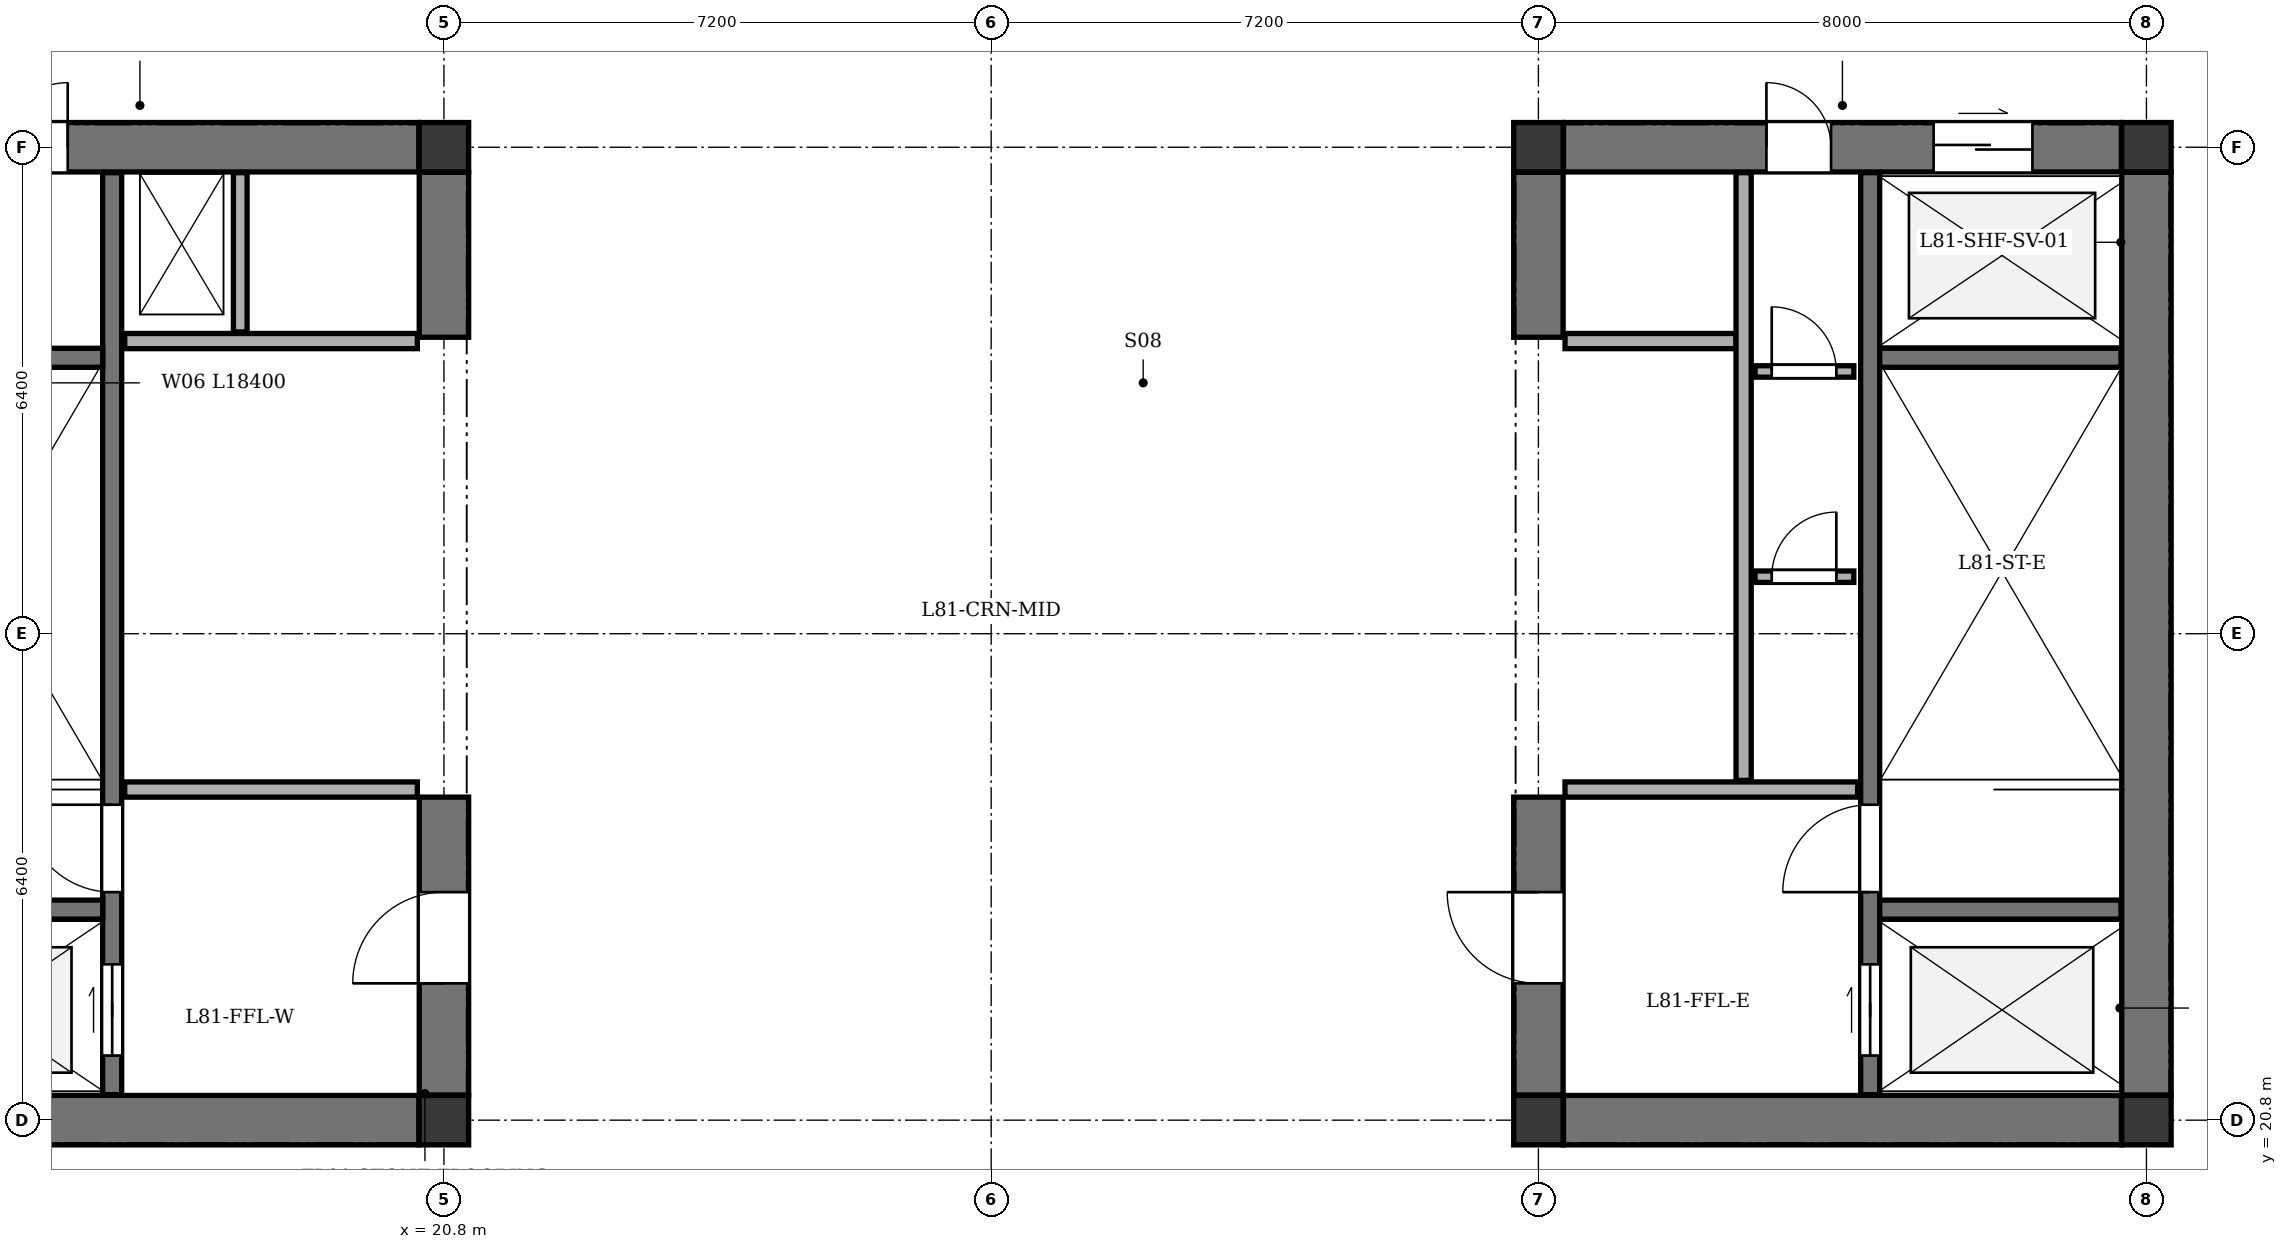
"""IFC4 building model, lengths in metres.
Left out: names, types, materials, properties, quantities, classifications, styles, units other than length and angle.
Written with IfcOpenShell. Run it as: python <this file> out.ifc"""

import sys

from ifc_helpers import new_model, si_unit, direction, frame, frame_2d, origin, origin_2d, place, context, subcontext, project, spatial, rectangle, extrude, element, fill, save


model = new_model("IFC4")
c1 = context("Model", 3, precision=1e-05, world=origin(), true_north=direction((0.0, 1.0)))
c2 = subcontext(c1, "Body", "Model", "MODEL_VIEW")
j1 = project(units=[si_unit("LENGTHUNIT", "METRE"), si_unit("PLANEANGLEUNIT", "RADIAN")], contexts=[c1])
p1 = place(None, origin())
s1 = spatial("IfcSite", under=j1, at=p1, CompositionType="ELEMENT")
p2 = place(p1, origin())
s2 = spatial("IfcBuilding", under=s1, at=p2, CompositionType="ELEMENT")
p3 = place(p2, frame((0.0, 0.0, 309.0)))
s3 = spatial("IfcBuildingStorey", under=s2, at=p3, CompositionType="ELEMENT", Elevation=309.0)
for number, where, z_axis, x_axis in (
    (1, (20.8, 20.8, 0.0), (0.0, 0.0, 1.0), (1.0, 0.0, 0.0)),
    (2, (20.8, 33.6, 0.0), (0.0, 0.0, 1.0), (1.0, 0.0, 0.0)),
    (3, (35.2, 20.8, 0.0), (0.0, 0.0, 1.0), (1.0, 0.0, 0.0)),
    (4, (43.2, 20.8, 0.0), (0.0, 0.0, 1.0), (1.0, 0.0, 0.0)),
    (5, (35.2, 33.6, 0.0), (0.0, 0.0, 1.0), (1.0, 0.0, 0.0)),
    (6, (43.2, 33.6, 0.0), (0.0, 0.0, 1.0), (1.0, 0.0, 0.0)),
):
    element("IfcColumn", number, at=place(p3, frame(where, z_axis=z_axis, x_axis=x_axis)), inside=s3, PredefinedType="COLUMN", context=c2, shape_type="SweptSolid", body=[
        extrude(rectangle(XDim=0.65, YDim=0.65, at=origin_2d()), origin(), (0.0, 0.0, 1.0), 4.2),
    ])
p4 = place(p3, frame((13.13, 20.8, 0.0), z_axis=(0.0, 0.0, 1.0), x_axis=(1.0, 0.0, 0.0)))
e7 = element("IfcWall", 7, at=p4, inside=s3, PredefinedType="SHEAR", context=c2, shape_type="SweptSolid", body=[
    extrude(rectangle(XDim=7.34, YDim=0.65, at=frame_2d((3.67, 0.0))), origin(), (0.0, 0.0, 1.0), 4.28),
])
p5 = place(p3, frame((13.13, 33.6, 0.0), z_axis=(0.0, 0.0, 1.0), x_axis=(1.0, 0.0, 0.0)))
e8 = element("IfcWall", 8, at=p5, inside=s3, PredefinedType="SHEAR", context=c2, shape_type="SweptSolid", body=[
    extrude(rectangle(XDim=7.34, YDim=0.65, at=frame_2d((3.67, 0.0))), origin(), (0.0, 0.0, 1.0), 4.28),
])
p6 = place(p5, frame((0.57, 0.0, 0.0)))
e9 = element("IfcOpeningElement", 9, at=p6, cuts=e8, PredefinedType="OPENING", context=c2, shape_type="SweptSolid", body=[
    extrude(rectangle(XDim=0.85, YDim=2.02, at=frame_2d((0.425, 1.01))), frame((0.0, 0.335, 0.0), z_axis=(0.0, -1.0, 0.0), x_axis=(1.0, 0.0, 0.0)), (0.0, 0.0, 1.0), 0.67),
])
p7 = place(p5, frame((1.87, 0.0, 0.0)))
e10 = element("IfcOpeningElement", 10, at=p7, cuts=e8, PredefinedType="OPENING", context=c2, shape_type="SweptSolid", body=[
    extrude(rectangle(XDim=0.85, YDim=2.02, at=frame_2d((0.425, 1.01))), frame((0.0, 0.335, 0.0), z_axis=(0.0, -1.0, 0.0), x_axis=(1.0, 0.0, 0.0)), (0.0, 0.0, 1.0), 0.67),
])
p8 = place(p3, frame((20.8, 21.13, 0.0), z_axis=(0.0, 0.0, 1.0), x_axis=(0.0, 1.0, 0.0)))
e11 = element("IfcWall", 11, at=p8, inside=s3, PredefinedType="SHEAR", context=c2, shape_type="SweptSolid", body=[
    extrude(rectangle(XDim=3.92, YDim=0.65, at=frame_2d((1.96, 0.0))), origin(), (0.0, 0.0, 1.0), 4.28),
])
p9 = place(p8, frame((1.47, 0.0, 0.0)))
e12 = element("IfcOpeningElement", 12, at=p9, cuts=e11, PredefinedType="OPENING", context=c2, shape_type="SweptSolid", body=[
    extrude(rectangle(XDim=1.2, YDim=2.15, at=frame_2d((0.6, 1.075))), frame((0.0, 0.335, 0.0), z_axis=(0.0, -1.0, 0.0), x_axis=(1.0, 0.0, 0.0)), (0.0, 0.0, 1.0), 0.67),
])
p10 = place(p3, frame((20.8, 31.1, 0.0), z_axis=(0.0, 0.0, 1.0), x_axis=(0.0, 1.0, 0.0)))
e13 = element("IfcWall", 13, at=p10, inside=s3, PredefinedType="SHEAR", context=c2, shape_type="SweptSolid", body=[
    extrude(rectangle(XDim=2.17, YDim=0.65, at=frame_2d((1.085, 0.0))), origin(), (0.0, 0.0, 1.0), 4.28),
])
p11 = place(p3, frame((16.435, 21.135, 0.0), z_axis=(0.0, 0.0, 1.0), x_axis=(0.0, 1.0, 0.0)))
e14 = element("IfcWall", 14, at=p11, inside=s3, PredefinedType="SHEAR", context=c2, shape_type="SweptSolid", body=[
    extrude(rectangle(XDim=12.13, YDim=0.25, at=frame_2d((6.065, 0.0))), origin(), (0.0, 0.0, 1.0), 4.28),
])
p12 = place(p11, frame((0.515, 0.0, 0.0)))
e15 = element("IfcOpeningElement", 15, at=p12, cuts=e14, PredefinedType="OPENING", context=c2, shape_type="SweptSolid", body=[
    extrude(rectangle(XDim=1.2, YDim=2.15, at=frame_2d((0.6, 1.075))), frame((0.0, 0.135, 0.0), z_axis=(0.0, -1.0, 0.0), x_axis=(1.0, 0.0, 0.0)), (0.0, 0.0, 1.0), 0.27),
])
p13 = place(p11, frame((2.665, 0.0, 0.0)))
e16 = element("IfcOpeningElement", 16, at=p13, cuts=e14, PredefinedType="OPENING", context=c2, shape_type="SweptSolid", body=[
    extrude(rectangle(XDim=1.15, YDim=2.15, at=frame_2d((0.575, 1.075))), frame((0.0, 0.135, 0.0), z_axis=(0.0, -1.0, 0.0), x_axis=(1.0, 0.0, 0.0)), (0.0, 0.0, 1.0), 0.27),
])
for number, where, z_axis, x_axis in (
    (17, (13.135, 23.57, 0.0), (0.0, 0.0, 1.0), (1.0, 0.0, 0.0)),
    (18, (13.135, 30.83, 0.0), (0.0, 0.0, 1.0), (1.0, 0.0, 0.0)),
):
    element("IfcWall", number, at=place(p3, frame(where, z_axis=z_axis, x_axis=x_axis)), inside=s3, PredefinedType="SHEAR", context=c2, shape_type="SweptSolid", body=[
        extrude(rectangle(XDim=3.175, YDim=0.25, at=frame_2d((1.587, 0.0))), origin(), (0.0, 0.0, 1.0), 4.28),
    ])
for number, where, z_axis, x_axis in (
    (19, (16.6, 25.15, 0.0), (0.0, 0.0, 1.0), (1.0, 0.0, 0.0)),
    (20, (16.6, 31.05, 0.0), (0.0, 0.0, 1.0), (1.0, 0.0, 0.0)),
):
    element("IfcWall", number, at=place(p3, frame(where, z_axis=z_axis, x_axis=x_axis)), inside=s3, PredefinedType="SOLIDWALL", context=c2, shape_type="SweptSolid", body=[
        extrude(rectangle(XDim=3.85, YDim=0.2, at=frame_2d((1.925, 0.0))), origin(), (0.0, 0.0, 1.0), 4.28),
    ])
p14 = place(p3, frame((18.12, 31.17, 0.0), z_axis=(0.0, 0.0, 1.0), x_axis=(0.0, 1.0, 0.0)))
e21 = element("IfcWall", 21, at=p14, inside=s3, PredefinedType="PARTITIONING", context=c2, shape_type="SweptSolid", body=[
    extrude(rectangle(XDim=2.095, YDim=0.18, at=frame_2d((1.047, 0.0))), origin(), (0.0, 0.0, 1.0), 4.28),
])
p15 = place(p3, frame((43.2, 21.13, 0.0), z_axis=(0.0, 0.0, 1.0), x_axis=(0.0, 1.0, 0.0)))
e22 = element("IfcWall", 22, at=p15, inside=s3, PredefinedType="SHEAR", context=c2, shape_type="SweptSolid", body=[
    extrude(rectangle(XDim=12.14, YDim=0.65, at=frame_2d((6.07, 0.0))), origin(), (0.0, 0.0, 1.0), 4.28),
])
p16 = place(p3, frame((35.53, 20.8, 0.0), z_axis=(0.0, 0.0, 1.0), x_axis=(1.0, 0.0, 0.0)))
e23 = element("IfcWall", 23, at=p16, inside=s3, PredefinedType="SHEAR", context=c2, shape_type="SweptSolid", body=[
    extrude(rectangle(XDim=7.34, YDim=0.65, at=frame_2d((3.67, 0.0))), origin(), (0.0, 0.0, 1.0), 4.28),
])
p17 = place(p3, frame((35.53, 33.6, 0.0), z_axis=(0.0, 0.0, 1.0), x_axis=(1.0, 0.0, 0.0)))
e24 = element("IfcWall", 24, at=p17, inside=s3, PredefinedType="SHEAR", context=c2, shape_type="SweptSolid", body=[
    extrude(rectangle(XDim=7.34, YDim=0.65, at=frame_2d((3.67, 0.0))), origin(), (0.0, 0.0, 1.0), 4.28),
])
p18 = place(p17, frame((4.87, 0.0, 0.0)))
e25 = element("IfcOpeningElement", 25, at=p18, cuts=e24, PredefinedType="OPENING", context=c2, shape_type="SweptSolid", body=[
    extrude(rectangle(XDim=1.3, YDim=2.15, at=frame_2d((0.65, 1.075))), frame((0.0, 0.335, 0.0), z_axis=(0.0, -1.0, 0.0), x_axis=(1.0, 0.0, 0.0)), (0.0, 0.0, 1.0), 0.67),
])
p19 = place(p17, frame((2.67, 0.0, 0.0)))
e26 = element("IfcOpeningElement", 26, at=p19, cuts=e24, PredefinedType="OPENING", context=c2, shape_type="SweptSolid", body=[
    extrude(rectangle(XDim=0.85, YDim=2.02, at=frame_2d((0.425, 1.01))), frame((0.0, 0.335, 0.0), z_axis=(0.0, -1.0, 0.0), x_axis=(1.0, 0.0, 0.0)), (0.0, 0.0, 1.0), 0.67),
])
p20 = place(p3, frame((35.2, 21.13, 0.0), z_axis=(0.0, 0.0, 1.0), x_axis=(0.0, 1.0, 0.0)))
e27 = element("IfcWall", 27, at=p20, inside=s3, PredefinedType="SHEAR", context=c2, shape_type="SweptSolid", body=[
    extrude(rectangle(XDim=3.92, YDim=0.65, at=frame_2d((1.96, 0.0))), origin(), (0.0, 0.0, 1.0), 4.28),
])
p21 = place(p20, frame((1.47, 0.0, 0.0)))
e28 = element("IfcOpeningElement", 28, at=p21, cuts=e27, PredefinedType="OPENING", context=c2, shape_type="SweptSolid", body=[
    extrude(rectangle(XDim=1.2, YDim=2.15, at=frame_2d((0.6, 1.075))), frame((0.0, 0.335, 0.0), z_axis=(0.0, -1.0, 0.0), x_axis=(1.0, 0.0, 0.0)), (0.0, 0.0, 1.0), 0.67),
])
p22 = place(p3, frame((35.2, 31.1, 0.0), z_axis=(0.0, 0.0, 1.0), x_axis=(0.0, 1.0, 0.0)))
e29 = element("IfcWall", 29, at=p22, inside=s3, PredefinedType="SHEAR", context=c2, shape_type="SweptSolid", body=[
    extrude(rectangle(XDim=2.17, YDim=0.65, at=frame_2d((1.085, 0.0))), origin(), (0.0, 0.0, 1.0), 4.28),
])
p23 = place(p3, frame((39.565, 21.135, 0.0), z_axis=(0.0, 0.0, 1.0), x_axis=(0.0, 1.0, 0.0)))
e30 = element("IfcWall", 30, at=p23, inside=s3, PredefinedType="SHEAR", context=c2, shape_type="SweptSolid", body=[
    extrude(rectangle(XDim=12.13, YDim=0.25, at=frame_2d((6.065, 0.0))), origin(), (0.0, 0.0, 1.0), 4.28),
])
p24 = place(p23, frame((0.515, 0.0, 0.0)))
e31 = element("IfcOpeningElement", 31, at=p24, cuts=e30, PredefinedType="OPENING", context=c2, shape_type="SweptSolid", body=[
    extrude(rectangle(XDim=1.2, YDim=2.15, at=frame_2d((0.6, 1.075))), frame((0.0, 0.135, 0.0), z_axis=(0.0, -1.0, 0.0), x_axis=(1.0, 0.0, 0.0)), (0.0, 0.0, 1.0), 0.27),
])
p25 = place(p23, frame((2.665, 0.0, 0.0)))
e32 = element("IfcOpeningElement", 32, at=p25, cuts=e30, PredefinedType="OPENING", context=c2, shape_type="SweptSolid", body=[
    extrude(rectangle(XDim=1.15, YDim=2.15, at=frame_2d((0.575, 1.075))), frame((0.0, 0.135, 0.0), z_axis=(0.0, -1.0, 0.0), x_axis=(1.0, 0.0, 0.0)), (0.0, 0.0, 1.0), 0.27),
])
for number, where, z_axis, x_axis in (
    (33, (39.69, 23.57, 0.0), (0.0, 0.0, 1.0), (1.0, 0.0, 0.0)),
    (34, (39.69, 30.83, 0.0), (0.0, 0.0, 1.0), (1.0, 0.0, 0.0)),
):
    element("IfcWall", number, at=place(p3, frame(where, z_axis=z_axis, x_axis=x_axis)), inside=s3, PredefinedType="SHEAR", context=c2, shape_type="SweptSolid", body=[
        extrude(rectangle(XDim=3.175, YDim=0.25, at=frame_2d((1.587, 0.0))), origin(), (0.0, 0.0, 1.0), 4.28),
    ])
p26 = place(p3, frame((35.55, 25.15, 0.0), z_axis=(0.0, 0.0, 1.0), x_axis=(1.0, 0.0, 0.0)))
e35 = element("IfcWall", 35, at=p26, inside=s3, PredefinedType="SOLIDWALL", context=c2, shape_type="SweptSolid", body=[
    extrude(rectangle(XDim=3.85, YDim=0.2, at=frame_2d((1.925, 0.0))), origin(), (0.0, 0.0, 1.0), 4.28),
])
p27 = place(p3, frame((35.55, 31.05, 0.0), z_axis=(0.0, 0.0, 1.0), x_axis=(1.0, 0.0, 0.0)))
e36 = element("IfcWall", 36, at=p27, inside=s3, PredefinedType="SOLIDWALL", context=c2, shape_type="SweptSolid", body=[
    extrude(rectangle(XDim=2.25, YDim=0.2, at=frame_2d((1.125, 0.0))), origin(), (0.0, 0.0, 1.0), 4.28),
])
p28 = place(p3, frame((37.9, 25.27, 0.0), z_axis=(0.0, 0.0, 1.0), x_axis=(0.0, 1.0, 0.0)))
e37 = element("IfcWall", 37, at=p28, inside=s3, PredefinedType="SOLIDWALL", context=c2, shape_type="SweptSolid", body=[
    extrude(rectangle(XDim=7.995, YDim=0.2, at=frame_2d((3.998, 0.0))), origin(), (0.0, 0.0, 1.0), 4.28),
])
p29 = place(p3, frame((38.05, 27.95, 0.0), z_axis=(0.0, 0.0, 1.0), x_axis=(1.0, 0.0, 0.0)))
e38 = element("IfcWall", 38, at=p29, inside=s3, PredefinedType="PARTITIONING", context=c2, shape_type="SweptSolid", body=[
    extrude(rectangle(XDim=1.3, YDim=0.15, at=frame_2d((0.65, 0.0))), origin(), (0.0, 0.0, 1.0), 3.88),
])
p30 = place(p29, frame((0.22, 0.0, 0.0)))
e39 = element("IfcOpeningElement", 39, at=p30, cuts=e38, PredefinedType="OPENING", context=c2, shape_type="SweptSolid", body=[
    extrude(rectangle(XDim=0.85, YDim=2.02, at=frame_2d((0.425, 1.01))), frame((0.0, 0.085, 0.0), z_axis=(0.0, -1.0, 0.0), x_axis=(1.0, 0.0, 0.0)), (0.0, 0.0, 1.0), 0.17),
])
p31 = place(p3, frame((38.05, 30.65, 0.0), z_axis=(0.0, 0.0, 1.0), x_axis=(1.0, 0.0, 0.0)))
e40 = element("IfcWall", 40, at=p31, inside=s3, PredefinedType="PARTITIONING", context=c2, shape_type="SweptSolid", body=[
    extrude(rectangle(XDim=1.3, YDim=0.15, at=frame_2d((0.65, 0.0))), origin(), (0.0, 0.0, 1.0), 3.88),
])
p32 = place(p31, frame((0.22, 0.0, 0.0)))
e41 = element("IfcOpeningElement", 41, at=p32, cuts=e40, PredefinedType="OPENING", context=c2, shape_type="SweptSolid", body=[
    extrude(rectangle(XDim=0.85, YDim=2.02, at=frame_2d((0.425, 1.01))), frame((0.0, 0.085, 0.0), z_axis=(0.0, -1.0, 0.0), x_axis=(1.0, 0.0, 0.0)), (0.0, 0.0, 1.0), 0.17),
])
p33 = place(p7, origin())
e42 = element("IfcDoor", 42, at=p33, inside=s3, OperationType="SINGLE_SWING_RIGHT", PredefinedType="DOOR", context=c2, shape_type="SweptSolid", body=[
    extrude(rectangle(XDim=0.85, YDim=2.02, at=frame_2d((0.425, 1.01))), frame((0.0, 0.025, 0.0), z_axis=(0.0, -1.0, 0.0), x_axis=(1.0, 0.0, 0.0)), (0.0, 0.0, 1.0), 0.05),
])
fill(e10, e42)
p34 = place(p9, origin())
e43 = element("IfcDoor", 43, at=p34, inside=s3, OperationType="SINGLE_SWING_LEFT", PredefinedType="DOOR", context=c2, shape_type="SweptSolid", body=[
    extrude(rectangle(XDim=1.2, YDim=2.15, at=frame_2d((0.6, 1.075))), frame((0.0, 0.025, 0.0), z_axis=(0.0, -1.0, 0.0), x_axis=(1.0, 0.0, 0.0)), (0.0, 0.0, 1.0), 0.05),
])
fill(e12, e43)
p35 = place(p12, origin())
e44 = element("IfcDoor", 44, at=p35, inside=s3, OperationType="DOUBLE_DOOR_SLIDING", PredefinedType="DOOR", context=c2, shape_type="SweptSolid", body=[
    extrude(rectangle(XDim=1.2, YDim=2.15, at=frame_2d((0.6, 1.075))), frame((0.0, 0.025, 0.0), z_axis=(0.0, -1.0, 0.0), x_axis=(1.0, 0.0, 0.0)), (0.0, 0.0, 1.0), 0.05),
])
fill(e15, e44)
p36 = place(p13, origin())
e45 = element("IfcDoor", 45, at=p36, inside=s3, OperationType="SINGLE_SWING_RIGHT", PredefinedType="DOOR", context=c2, shape_type="SweptSolid", body=[
    extrude(rectangle(XDim=1.15, YDim=2.15, at=frame_2d((0.575, 1.075))), frame((0.0, 0.025, 0.0), z_axis=(0.0, -1.0, 0.0), x_axis=(1.0, 0.0, 0.0)), (0.0, 0.0, 1.0), 0.05),
])
fill(e16, e45)
p37 = place(p18, origin())
e46 = element("IfcDoor", 46, at=p37, inside=s3, OperationType="DOUBLE_DOOR_SLIDING", PredefinedType="DOOR", context=c2, shape_type="SweptSolid", body=[
    extrude(rectangle(XDim=1.3, YDim=2.15, at=frame_2d((0.65, 1.075))), frame((0.0, 0.025, 0.0), z_axis=(0.0, -1.0, 0.0), x_axis=(1.0, 0.0, 0.0)), (0.0, 0.0, 1.0), 0.05),
])
fill(e25, e46)
p38 = place(p19, origin())
e47 = element("IfcDoor", 47, at=p38, inside=s3, OperationType="SINGLE_SWING_LEFT", PredefinedType="DOOR", context=c2, shape_type="SweptSolid", body=[
    extrude(rectangle(XDim=0.85, YDim=2.02, at=frame_2d((0.425, 1.01))), frame((0.0, 0.025, 0.0), z_axis=(0.0, -1.0, 0.0), x_axis=(1.0, 0.0, 0.0)), (0.0, 0.0, 1.0), 0.05),
])
fill(e26, e47)
p39 = place(p21, origin())
e48 = element("IfcDoor", 48, at=p39, inside=s3, OperationType="SINGLE_SWING_RIGHT", PredefinedType="DOOR", context=c2, shape_type="SweptSolid", body=[
    extrude(rectangle(XDim=1.2, YDim=2.15, at=frame_2d((0.6, 1.075))), frame((0.0, 0.025, 0.0), z_axis=(0.0, -1.0, 0.0), x_axis=(1.0, 0.0, 0.0)), (0.0, 0.0, 1.0), 0.05),
])
fill(e28, e48)
p40 = place(p24, origin())
e49 = element("IfcDoor", 49, at=p40, inside=s3, OperationType="DOUBLE_DOOR_SLIDING", PredefinedType="DOOR", context=c2, shape_type="SweptSolid", body=[
    extrude(rectangle(XDim=1.2, YDim=2.15, at=frame_2d((0.6, 1.075))), frame((0.0, 0.025, 0.0), z_axis=(0.0, -1.0, 0.0), x_axis=(1.0, 0.0, 0.0)), (0.0, 0.0, 1.0), 0.05),
])
fill(e31, e49)
p41 = place(p25, origin())
e50 = element("IfcDoor", 50, at=p41, inside=s3, OperationType="SINGLE_SWING_LEFT", PredefinedType="DOOR", context=c2, shape_type="SweptSolid", body=[
    extrude(rectangle(XDim=1.15, YDim=2.15, at=frame_2d((0.575, 1.075))), frame((0.0, 0.025, 0.0), z_axis=(0.0, -1.0, 0.0), x_axis=(1.0, 0.0, 0.0)), (0.0, 0.0, 1.0), 0.05),
])
fill(e32, e50)
p42 = place(p30, origin())
e51 = element("IfcDoor", 51, at=p42, inside=s3, OperationType="SINGLE_SWING_RIGHT", PredefinedType="DOOR", context=c2, shape_type="SweptSolid", body=[
    extrude(rectangle(XDim=0.85, YDim=2.02, at=frame_2d((0.425, 1.01))), frame((0.0, 0.025, 0.0), z_axis=(0.0, -1.0, 0.0), x_axis=(1.0, 0.0, 0.0)), (0.0, 0.0, 1.0), 0.05),
])
fill(e39, e51)
p43 = place(p32, origin())
e52 = element("IfcDoor", 52, at=p43, inside=s3, OperationType="SINGLE_SWING_LEFT", PredefinedType="DOOR", context=c2, shape_type="SweptSolid", body=[
    extrude(rectangle(XDim=0.85, YDim=2.02, at=frame_2d((0.425, 1.01))), frame((0.0, 0.025, 0.0), z_axis=(0.0, -1.0, 0.0), x_axis=(1.0, 0.0, 0.0)), (0.0, 0.0, 1.0), 0.05),
])
fill(e41, e52)
save(model, sys.argv[1])
